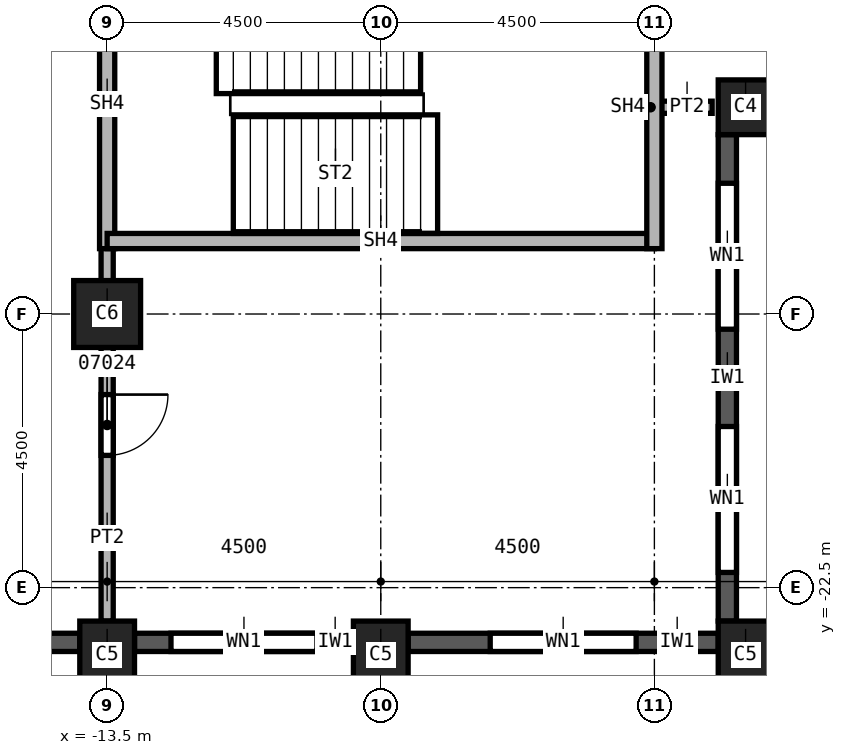
"""IFC4 building model, lengths in metres.
Left out: names, types, materials, properties, quantities, classifications, styles, units other than length and angle.
Written with IfcOpenShell. Run it as: python <this file> out.ifc"""

import sys

from ifc_helpers import new_model, si_unit, direction, frame, frame_2d, origin, origin_2d, place, context, subcontext, project, spatial, rectangle, extrude, element, fill, save


model = new_model("IFC4")
c1 = context("Model", 3, precision=1e-05, world=origin(), true_north=direction((0.0, 1.0)))
c2 = subcontext(c1, "Body", "Model", "MODEL_VIEW")
j1 = project(units=[si_unit("LENGTHUNIT", "METRE"), si_unit("PLANEANGLEUNIT", "RADIAN")], contexts=[c1])
p1 = place(None, origin())
s1 = spatial("IfcSite", under=j1, at=p1, CompositionType="ELEMENT")
p2 = place(p1, origin())
s2 = spatial("IfcBuilding", under=s1, at=p2, CompositionType="ELEMENT")
p3 = place(p2, frame((0.0, 0.0, 138.0)))
s3 = spatial("IfcBuildingStorey", under=s2, at=p3, CompositionType="ELEMENT", Elevation=138.0)
p4 = place(p3, frame((-13.5, -18.0, 0.0), z_axis=(0.0, 0.0, 1.0), x_axis=(1.0, 0.0, 0.0)))
e1 = element("IfcColumn", 1, at=p4, inside=s3, PredefinedType="COLUMN", context=c2, shape_type="SweptSolid", body=[
    extrude(rectangle(XDim=1.1, YDim=1.1, at=origin_2d()), origin(), (0.0, 0.0, 1.0), 3.7),
])
for number, where, z_axis, x_axis in (
    (2, (-3.0, -23.6, 0.0), (0.0, 0.0, 1.0), (1.0, 0.0, 0.0)),
    (3, (-9.0, -23.6, 0.0), (0.0, 0.0, 1.0), (1.0, 0.0, 0.0)),
    (4, (-13.5, -23.6, 0.0), (0.0, 0.0, 1.0), (1.0, 0.0, 0.0)),
):
    element("IfcColumn", number, at=place(p3, frame(where, z_axis=z_axis, x_axis=x_axis)), inside=s3, PredefinedType="COLUMN", context=c2, shape_type="SweptSolid", body=[
        extrude(rectangle(XDim=0.9, YDim=1.1, at=origin_2d()), origin(), (0.0, 0.0, 1.0), 3.7),
    ])
p5 = place(p3, frame((-3.0, -14.6, 0.0), z_axis=(0.0, 0.0, 1.0), x_axis=(1.0, 0.0, 0.0)))
e5 = element("IfcColumn", 5, at=p5, inside=s3, PredefinedType="COLUMN", context=c2, shape_type="SweptSolid", body=[
    extrude(rectangle(XDim=0.9, YDim=0.9, at=origin_2d()), origin(), (0.0, 0.0, 1.0), 3.7),
])
p6 = place(p3, frame((-17.55, -23.4, 0.0), z_axis=(0.0, 0.0, 1.0), x_axis=(1.0, 0.0, 0.0)))
e6 = element("IfcWall", 6, at=p6, inside=s3, PredefinedType="SOLIDWALL", context=c2, shape_type="SweptSolid", body=[
    extrude(rectangle(XDim=3.6, YDim=0.3, at=frame_2d((1.8, 0.0))), origin(), (0.0, 0.0, 1.0), 3.1),
])
p7 = place(p6, frame((0.775, 0.0, 0.8)))
e7 = element("IfcOpeningElement", 7, at=p7, cuts=e6, PredefinedType="OPENING", context=c2, shape_type="SweptSolid", body=[
    extrude(rectangle(XDim=1.0, YDim=1.95, at=frame_2d((0.5, 0.975))), frame((0.0, 0.15, 0.0), z_axis=(0.0, -1.0, 0.0), x_axis=(1.0, 0.0, 0.0)), (0.0, 0.0, 1.0), 0.3),
])
p8 = place(p6, frame((2.375, 0.0, 0.8)))
e8 = element("IfcOpeningElement", 8, at=p8, cuts=e6, PredefinedType="OPENING", context=c2, shape_type="SweptSolid", body=[
    extrude(rectangle(XDim=0.6, YDim=1.95, at=frame_2d((0.3, 0.975))), frame((0.0, 0.15, 0.0), z_axis=(0.0, -1.0, 0.0), x_axis=(1.0, 0.0, 0.0)), (0.0, 0.0, 1.0), 0.3),
])
p9 = place(p3, frame((-13.05, -23.4, 0.0), z_axis=(0.0, 0.0, 1.0), x_axis=(1.0, 0.0, 0.0)))
e9 = element("IfcWall", 9, at=p9, inside=s3, PredefinedType="SOLIDWALL", context=c2, shape_type="SweptSolid", body=[
    extrude(rectangle(XDim=3.6, YDim=0.3, at=frame_2d((1.8, 0.0))), origin(), (0.0, 0.0, 1.0), 3.1),
])
p10 = place(p9, frame((0.6, 0.0, 0.8)))
e10 = element("IfcOpeningElement", 10, at=p10, cuts=e9, PredefinedType="OPENING", context=c2, shape_type="SweptSolid", body=[
    extrude(rectangle(XDim=2.4, YDim=1.95, at=frame_2d((1.2, 0.975))), frame((0.0, 0.15, 0.0), z_axis=(0.0, -1.0, 0.0), x_axis=(1.0, 0.0, 0.0)), (0.0, 0.0, 1.0), 0.3),
])
p11 = place(p3, frame((-8.55, -23.4, 0.0), z_axis=(0.0, 0.0, 1.0), x_axis=(1.0, 0.0, 0.0)))
e11 = element("IfcWall", 11, at=p11, inside=s3, PredefinedType="SOLIDWALL", context=c2, shape_type="SweptSolid", body=[
    extrude(rectangle(XDim=5.1, YDim=0.3, at=frame_2d((2.55, 0.0))), origin(), (0.0, 0.0, 1.0), 3.1),
])
p12 = place(p11, frame((1.35, 0.0, 0.8)))
e12 = element("IfcOpeningElement", 12, at=p12, cuts=e11, PredefinedType="OPENING", context=c2, shape_type="SweptSolid", body=[
    extrude(rectangle(XDim=2.4, YDim=1.95, at=frame_2d((1.2, 0.975))), frame((0.0, 0.15, 0.0), z_axis=(0.0, -1.0, 0.0), x_axis=(1.0, 0.0, 0.0)), (0.0, 0.0, 1.0), 0.3),
])
p13 = place(p3, frame((-3.3, -23.05, 0.0), z_axis=(0.0, 0.0, 1.0), x_axis=(0.0, 1.0, 0.0)))
e13 = element("IfcWall", 13, at=p13, inside=s3, PredefinedType="SOLIDWALL", context=c2, shape_type="SweptSolid", body=[
    extrude(rectangle(XDim=8.0, YDim=0.3, at=frame_2d((4.0, 0.0))), origin(), (0.0, 0.0, 1.0), 3.1),
])
p14 = place(p13, frame((0.8, 0.0, 0.8)))
e14 = element("IfcOpeningElement", 14, at=p14, cuts=e13, PredefinedType="OPENING", context=c2, shape_type="SweptSolid", body=[
    extrude(rectangle(XDim=2.4, YDim=1.95, at=frame_2d((1.2, 0.975))), frame((0.0, 0.15, 0.0), z_axis=(0.0, -1.0, 0.0), x_axis=(1.0, 0.0, 0.0)), (0.0, 0.0, 1.0), 0.3),
])
p15 = place(p13, frame((4.8, 0.0, 0.8)))
e15 = element("IfcOpeningElement", 15, at=p15, cuts=e13, PredefinedType="OPENING", context=c2, shape_type="SweptSolid", body=[
    extrude(rectangle(XDim=2.4, YDim=1.95, at=frame_2d((1.2, 0.975))), frame((0.0, 0.15, 0.0), z_axis=(0.0, -1.0, 0.0), x_axis=(1.0, 0.0, 0.0)), (0.0, 0.0, 1.0), 0.3),
])
p16 = place(p3, frame((-13.5, -16.675, 0.0), z_axis=(0.0, 0.0, 1.0), x_axis=(0.0, -1.0, 0.0)))
e16 = element("IfcWall", 16, at=p16, inside=s3, PredefinedType="PARTITIONING", context=c2, shape_type="SweptSolid", body=[
    extrude(rectangle(XDim=6.375, YDim=0.2, at=frame_2d((3.188, 0.0))), origin(), (0.0, 0.0, 1.0), 3.7),
])
p17 = place(p16, frame((2.65, 0.0, 0.0)))
e17 = element("IfcOpeningElement", 17, at=p17, cuts=e16, PredefinedType="OPENING", context=c2, shape_type="SweptSolid", body=[
    extrude(rectangle(XDim=1.0, YDim=2.1, at=frame_2d((0.5, 1.05))), frame((0.0, 0.1, 0.0), z_axis=(0.0, -1.0, 0.0), x_axis=(1.0, 0.0, 0.0)), (0.0, 0.0, 1.0), 0.2),
])
p18 = place(p3, frame((-3.55, -14.6, 0.0), z_axis=(0.0, 0.0, 1.0), x_axis=(-1.0, 0.0, 0.0)))
e18 = element("IfcWall", 18, at=p18, inside=s3, PredefinedType="PARTITIONING", context=c2, shape_type="SweptSolid", body=[
    extrude(rectangle(XDim=0.95, YDim=0.2, at=frame_2d((0.475, 0.0))), origin(), (0.0, 0.0, 1.0), 3.7),
])
p19 = place(p3, frame((-13.5, -12.175, 0.0), z_axis=(0.0, 0.0, 1.0), x_axis=(0.0, -1.0, 0.0)))
e19 = element("IfcWall", 19, at=p19, inside=s3, PredefinedType="SOLIDWALL", context=c2, shape_type="SweptSolid", body=[
    extrude(rectangle(XDim=4.75, YDim=0.25, at=frame_2d((2.375, 0.0))), origin(), (0.0, 0.0, 1.0), 3.7),
])
p20 = place(p3, frame((-4.5, -16.8, 0.0), z_axis=(0.0, 0.0, 1.0), x_axis=(-1.0, 0.0, 0.0)))
e20 = element("IfcWall", 20, at=p20, inside=s3, PredefinedType="SOLIDWALL", context=c2, shape_type="SweptSolid", body=[
    extrude(rectangle(XDim=9.0, YDim=0.25, at=frame_2d((4.5, 0.0))), origin(), (0.0, 0.0, 1.0), 3.7),
])
p21 = place(p3, frame((-4.5, -12.3, 0.0), z_axis=(0.0, 0.0, 1.0), x_axis=(0.0, -1.0, 0.0)))
e21 = element("IfcWall", 21, at=p21, inside=s3, PredefinedType="SOLIDWALL", context=c2, shape_type="SweptSolid", body=[
    extrude(rectangle(XDim=4.625, YDim=0.25, at=frame_2d((2.312, 0.0))), origin(), (0.0, 0.0, 1.0), 3.7),
])
p22 = place(p10, origin())
e22 = element("IfcWindow", 22, at=p22, inside=s3, PartitioningType="SINGLE_PANEL", PredefinedType="WINDOW", context=c2, shape_type="SweptSolid", body=[
    extrude(rectangle(XDim=2.4, YDim=1.95, at=frame_2d((1.2, 0.975))), frame((0.0, 0.03, 0.0), z_axis=(0.0, -1.0, 0.0), x_axis=(1.0, 0.0, 0.0)), (0.0, 0.0, 1.0), 0.06),
])
fill(e10, e22)
p23 = place(p12, origin())
e23 = element("IfcWindow", 23, at=p23, inside=s3, PartitioningType="SINGLE_PANEL", PredefinedType="WINDOW", context=c2, shape_type="SweptSolid", body=[
    extrude(rectangle(XDim=2.4, YDim=1.95, at=frame_2d((1.2, 0.975))), frame((0.0, 0.03, 0.0), z_axis=(0.0, -1.0, 0.0), x_axis=(1.0, 0.0, 0.0)), (0.0, 0.0, 1.0), 0.06),
])
fill(e12, e23)
p24 = place(p14, origin())
e24 = element("IfcWindow", 24, at=p24, inside=s3, PartitioningType="SINGLE_PANEL", PredefinedType="WINDOW", context=c2, shape_type="SweptSolid", body=[
    extrude(rectangle(XDim=2.4, YDim=1.95, at=frame_2d((1.2, 0.975))), frame((0.0, 0.03, 0.0), z_axis=(0.0, -1.0, 0.0), x_axis=(1.0, 0.0, 0.0)), (0.0, 0.0, 1.0), 0.06),
])
fill(e14, e24)
p25 = place(p15, origin())
e25 = element("IfcWindow", 25, at=p25, inside=s3, PartitioningType="SINGLE_PANEL", PredefinedType="WINDOW", context=c2, shape_type="SweptSolid", body=[
    extrude(rectangle(XDim=2.4, YDim=1.95, at=frame_2d((1.2, 0.975))), frame((0.0, 0.03, 0.0), z_axis=(0.0, -1.0, 0.0), x_axis=(1.0, 0.0, 0.0)), (0.0, 0.0, 1.0), 0.06),
])
fill(e15, e25)
p26 = place(p17, origin())
e26 = element("IfcDoor", 26, at=p26, inside=s3, OperationType="SINGLE_SWING_LEFT", PredefinedType="DOOR", context=c2, shape_type="SweptSolid", body=[
    extrude(rectangle(XDim=1.0, YDim=2.1, at=frame_2d((0.5, 1.05))), frame((0.0, 0.025, 0.0), z_axis=(0.0, -1.0, 0.0), x_axis=(1.0, 0.0, 0.0)), (0.0, 0.0, 1.0), 0.05),
])
fill(e17, e26)
save(model, sys.argv[1])
